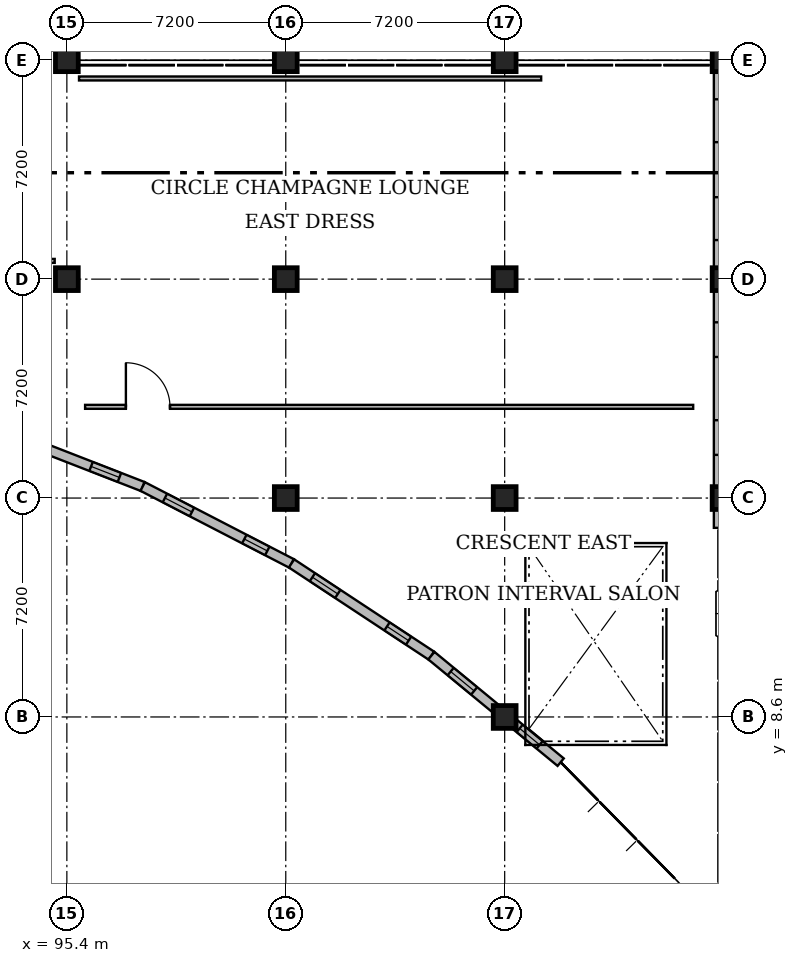
"""IFC4 building model, lengths in metres.
Left out: names, types, materials, properties, quantities, classifications, styles, units other than length and angle.
Written with IfcOpenShell. Run it as: python <this file> out.ifc"""

import sys

from ifc_helpers import new_model, si_unit, direction, frame, frame_2d, origin, origin_2d, place, context, subcontext, project, spatial, rectangle, circle, extrude, element, fill, save


model = new_model("IFC4")
c1 = context("Model", 3, precision=1e-05, world=origin(), true_north=direction((0.0, 1.0)))
c2 = subcontext(c1, "Body", "Model", "MODEL_VIEW")
j1 = project(units=[si_unit("LENGTHUNIT", "METRE"), si_unit("PLANEANGLEUNIT", "RADIAN")], contexts=[c1])
p1 = place(None, origin())
s1 = spatial("IfcSite", under=j1, at=p1, CompositionType="ELEMENT")
p2 = place(p1, origin())
s2 = spatial("IfcBuilding", under=s1, at=p2, CompositionType="ELEMENT")
p3 = place(p2, frame((0.0, 0.0, 4.8)))
s3 = spatial("IfcBuildingStorey", under=s2, at=p3, CompositionType="ELEMENT", Elevation=4.8)
for number, where, z_axis, x_axis in (
    (1, (95.4, 23.0, 0.0), (0.0, 0.0, 1.0), (1.0, 0.0, 0.0)),
    (2, (95.4, 30.2, 0.0), (0.0, 0.0, 1.0), (1.0, 0.0, 0.0)),
    (3, (102.6, 15.8, 0.0), (0.0, 0.0, 1.0), (1.0, 0.0, 0.0)),
    (4, (102.6, 23.0, 0.0), (0.0, 0.0, 1.0), (1.0, 0.0, 0.0)),
    (5, (102.6, 30.2, 0.0), (0.0, 0.0, 1.0), (1.0, 0.0, 0.0)),
    (6, (109.8, 8.6, 0.0), (0.0, 0.0, 1.0), (1.0, 0.0, 0.0)),
    (7, (109.8, 15.8, 0.0), (0.0, 0.0, 1.0), (1.0, 0.0, 0.0)),
    (8, (109.8, 23.0, 0.0), (0.0, 0.0, 1.0), (1.0, 0.0, 0.0)),
    (9, (109.8, 30.2, 0.0), (0.0, 0.0, 1.0), (1.0, 0.0, 0.0)),
    (10, (117.0, 15.8, 0.0), (0.0, 0.0, 1.0), (1.0, 0.0, 0.0)),
    (11, (117.0, 23.0, 0.0), (0.0, 0.0, 1.0), (1.0, 0.0, 0.0)),
    (12, (117.0, 30.2, 0.0), (0.0, 0.0, 1.0), (1.0, 0.0, 0.0)),
):
    element("IfcColumn", number, at=place(p3, frame(where, z_axis=z_axis, x_axis=x_axis)), inside=s3, PredefinedType="COLUMN", context=c2, shape_type="SweptSolid", body=[
        extrude(circle(Radius=0.375, at=origin_2d()), origin(), (0.0, 0.0, 1.0), 4.2),
    ])
p4 = place(p3, frame((92.76, 18.177, 0.0), z_axis=(0.0, 0.0, 1.0), x_axis=(0.931946449517, -0.362595939349, 0.0)))
e13 = element("IfcWall", 13, at=p4, inside=s3, PredefinedType="SOLIDWALL", context=c2, shape_type="SweptSolid", body=[
    extrude(rectangle(XDim=5.51, YDim=0.32, at=frame_2d((2.755, 0.0))), origin(), (0.0, 0.0, 1.0), 4.2),
])
p5 = place(p4, frame((0.823, 0.0, 0.78)))
e14 = element("IfcOpeningElement", 14, at=p5, cuts=e13, PredefinedType="OPENING", context=c2, shape_type="SweptSolid", body=[
    extrude(rectangle(XDim=1.0, YDim=1.95, at=frame_2d((0.5, 0.975))), frame((0.0, 0.18, 0.0), z_axis=(0.0, -1.0, 0.0), x_axis=(1.0, 0.0, 0.0)), (0.0, 0.0, 1.0), 0.36),
])
p6 = place(p4, frame((3.688, 0.0, 0.78)))
e15 = element("IfcOpeningElement", 15, at=p6, cuts=e13, PredefinedType="OPENING", context=c2, shape_type="SweptSolid", body=[
    extrude(rectangle(XDim=1.0, YDim=2.25, at=frame_2d((0.5, 1.125))), frame((0.0, 0.18, 0.0), z_axis=(0.0, -1.0, 0.0), x_axis=(1.0, 0.0, 0.0)), (0.0, 0.0, 1.0), 0.36),
])
p7 = place(p3, frame((97.895, 16.18, 0.0), z_axis=(0.0, 0.0, 1.0), x_axis=(0.888365365521, -0.459137209713, 0.0)))
e16 = element("IfcWall", 16, at=p7, inside=s3, PredefinedType="SOLIDWALL", context=c2, shape_type="SweptSolid", body=[
    extrude(rectangle(XDim=5.51, YDim=0.32, at=frame_2d((2.755, 0.0))), origin(), (0.0, 0.0, 1.0), 4.2),
])
p8 = place(p7, frame((0.823, 0.0, 0.633)))
e17 = element("IfcOpeningElement", 17, at=p8, cuts=e16, PredefinedType="OPENING", context=c2, shape_type="SweptSolid", body=[
    extrude(rectangle(XDim=1.0, YDim=2.05, at=frame_2d((0.5, 1.025))), frame((0.0, 0.18, 0.0), z_axis=(0.0, -1.0, 0.0), x_axis=(1.0, 0.0, 0.0)), (0.0, 0.0, 1.0), 0.36),
])
p9 = place(p7, frame((3.762, 0.0, 0.633)))
e18 = element("IfcOpeningElement", 18, at=p9, cuts=e16, PredefinedType="OPENING", context=c2, shape_type="SweptSolid", body=[
    extrude(rectangle(XDim=0.85, YDim=1.95, at=frame_2d((0.425, 0.975))), frame((0.0, 0.18, 0.0), z_axis=(0.0, -1.0, 0.0), x_axis=(1.0, 0.0, 0.0)), (0.0, 0.0, 1.0), 0.36),
])
p10 = place(p3, frame((102.79, 13.65, 0.0), z_axis=(0.0, 0.0, 1.0), x_axis=(0.834787412137, -0.550572408079, 0.0)))
e19 = element("IfcWall", 19, at=p10, inside=s3, PredefinedType="SOLIDWALL", context=c2, shape_type="SweptSolid", body=[
    extrude(rectangle(XDim=5.51, YDim=0.32, at=frame_2d((2.755, 0.0))), origin(), (0.0, 0.0, 1.0), 4.2),
])
p11 = place(p10, frame((0.822, 0.0, 0.514)))
e20 = element("IfcOpeningElement", 20, at=p11, cuts=e19, PredefinedType="OPENING", context=c2, shape_type="SweptSolid", body=[
    extrude(rectangle(XDim=1.0, YDim=2.15, at=frame_2d((0.5, 1.075))), frame((0.0, 0.18, 0.0), z_axis=(0.0, -1.0, 0.0), x_axis=(1.0, 0.0, 0.0)), (0.0, 0.0, 1.0), 0.36),
])
p12 = place(p10, frame((3.762, 0.0, 0.514)))
e21 = element("IfcOpeningElement", 21, at=p12, cuts=e19, PredefinedType="OPENING", context=c2, shape_type="SweptSolid", body=[
    extrude(rectangle(XDim=0.85, YDim=2.05, at=frame_2d((0.425, 1.025))), frame((0.0, 0.18, 0.0), z_axis=(0.0, -1.0, 0.0), x_axis=(1.0, 0.0, 0.0)), (0.0, 0.0, 1.0), 0.36),
])
p13 = place(p3, frame((107.389, 10.616, 0.0), z_axis=(0.0, 0.0, 1.0), x_axis=(0.771862443056, -0.635789563456, 0.0)))
e22 = element("IfcWall", 22, at=p13, inside=s3, PredefinedType="SOLIDWALL", context=c2, shape_type="SweptSolid", body=[
    extrude(rectangle(XDim=5.51, YDim=0.32, at=frame_2d((2.755, 0.0))), origin(), (0.0, 0.0, 1.0), 4.2),
])
p14 = place(p13, frame((0.823, 0.0, 0.448)))
e23 = element("IfcOpeningElement", 23, at=p14, cuts=e22, PredefinedType="OPENING", context=c2, shape_type="SweptSolid", body=[
    extrude(rectangle(XDim=1.0, YDim=2.25, at=frame_2d((0.5, 1.125))), frame((0.0, 0.18, 0.0), z_axis=(0.0, -1.0, 0.0), x_axis=(1.0, 0.0, 0.0)), (0.0, 0.0, 1.0), 0.36),
])
p15 = place(p13, frame((3.762, 0.0, 0.448)))
e24 = element("IfcOpeningElement", 24, at=p15, cuts=e22, PredefinedType="OPENING", context=c2, shape_type="SweptSolid", body=[
    extrude(rectangle(XDim=0.85, YDim=2.15, at=frame_2d((0.425, 1.075))), frame((0.0, 0.18, 0.0), z_axis=(0.0, -1.0, 0.0), x_axis=(1.0, 0.0, 0.0)), (0.0, 0.0, 1.0), 0.36),
])
p16 = place(p3, frame((116.84, 14.82, 0.0), z_axis=(0.0, 0.0, 1.0), x_axis=(0.0, 1.0, 0.0)))
e25 = element("IfcWall", 25, at=p16, inside=s3, PredefinedType="SOLIDWALL", context=c2, shape_type="SweptSolid", body=[
    extrude(rectangle(XDim=0.6, YDim=0.32, at=frame_2d((0.3, 0.0))), origin(), (0.0, 0.0, 1.0), 4.2),
])
p17 = place(p3, frame((116.84, 16.18, 0.0), z_axis=(0.0, 0.0, 1.0), x_axis=(0.0, 1.0, 0.0)))
e26 = element("IfcWall", 26, at=p17, inside=s3, PredefinedType="SOLIDWALL", context=c2, shape_type="SweptSolid", body=[
    extrude(rectangle(XDim=6.44, YDim=0.32, at=frame_2d((3.22, 0.0))), origin(), (0.0, 0.0, 1.0), 3.653),
])
p18 = place(p17, frame((1.04, 0.0, 0.95)))
e27 = element("IfcOpeningElement", 27, at=p18, cuts=e26, PredefinedType="OPENING", context=c2, shape_type="SweptSolid", body=[
    extrude(rectangle(XDim=1.14, YDim=1.6, at=frame_2d((0.57, 0.8))), frame((0.0, 0.18, 0.0), z_axis=(0.0, -1.0, 0.0), x_axis=(1.0, 0.0, 0.0)), (0.0, 0.0, 1.0), 0.36),
])
p19 = place(p17, frame((4.26, 0.0, 0.95)))
e28 = element("IfcOpeningElement", 28, at=p19, cuts=e26, PredefinedType="OPENING", context=c2, shape_type="SweptSolid", body=[
    extrude(rectangle(XDim=1.14, YDim=1.6, at=frame_2d((0.57, 0.8))), frame((0.0, 0.18, 0.0), z_axis=(0.0, -1.0, 0.0), x_axis=(1.0, 0.0, 0.0)), (0.0, 0.0, 1.0), 0.36),
])
p20 = place(p3, frame((116.84, 23.38, 0.0), z_axis=(0.0, 0.0, 1.0), x_axis=(0.0, 1.0, 0.0)))
e29 = element("IfcWall", 29, at=p20, inside=s3, PredefinedType="SOLIDWALL", context=c2, shape_type="SweptSolid", body=[
    extrude(rectangle(XDim=6.44, YDim=0.32, at=frame_2d((3.22, 0.0))), origin(), (0.0, 0.0, 1.0), 3.653),
])
p21 = place(p20, frame((0.905, 0.0, 0.95)))
e30 = element("IfcOpeningElement", 30, at=p21, cuts=e29, PredefinedType="OPENING", context=c2, shape_type="SweptSolid", body=[
    extrude(rectangle(XDim=1.41, YDim=1.7, at=frame_2d((0.705, 0.85))), frame((0.0, 0.18, 0.0), z_axis=(0.0, -1.0, 0.0), x_axis=(1.0, 0.0, 0.0)), (0.0, 0.0, 1.0), 0.36),
])
p22 = place(p20, frame((4.125, 0.0, 0.95)))
e31 = element("IfcOpeningElement", 31, at=p22, cuts=e29, PredefinedType="OPENING", context=c2, shape_type="SweptSolid", body=[
    extrude(rectangle(XDim=1.41, YDim=1.7, at=frame_2d((0.705, 0.85))), frame((0.0, 0.18, 0.0), z_axis=(0.0, -1.0, 0.0), x_axis=(1.0, 0.0, 0.0)), (0.0, 0.0, 1.0), 0.36),
])
p23 = place(p3, frame((95.8, 29.6, 0.0), z_axis=(0.0, 0.0, 1.0), x_axis=(1.0, 0.0, 0.0)))
e32 = element("IfcWall", 32, at=p23, inside=s3, PredefinedType="PARTITIONING", context=c2, shape_type="SweptSolid", body=[
    extrude(rectangle(XDim=15.2, YDim=0.13, at=frame_2d((7.6, 0.0))), origin(), (0.0, 0.0, 1.0), 3.94),
])
p24 = place(p3, frame((57.8, 23.6, 0.0), z_axis=(0.0, 0.0, 1.0), x_axis=(1.0, 0.0, 0.0)))
e33 = element("IfcWall", 33, at=p24, inside=s3, PredefinedType="PARTITIONING", context=c2, shape_type="SweptSolid", body=[
    extrude(rectangle(XDim=37.2, YDim=0.13, at=frame_2d((18.6, 0.0))), origin(), (0.0, 0.0, 1.0), 3.94),
])
p25 = place(p24, frame((15.265, 0.0, 0.0)))
e34 = element("IfcOpeningElement", 34, at=p25, cuts=e33, PredefinedType="OPENING", context=c2, shape_type="SweptSolid", body=[
    extrude(rectangle(XDim=1.45, YDim=2.2, at=frame_2d((0.725, 1.1))), frame((0.0, 0.085, 0.0), z_axis=(0.0, -1.0, 0.0), x_axis=(1.0, 0.0, 0.0)), (0.0, 0.0, 1.0), 0.17),
])
p26 = place(p3, frame((96.0, 18.8, 0.0), z_axis=(0.0, 0.0, 1.0), x_axis=(1.0, 0.0, 0.0)))
e35 = element("IfcWall", 35, at=p26, inside=s3, PredefinedType="PARTITIONING", context=c2, shape_type="SweptSolid", body=[
    extrude(rectangle(XDim=20.0, YDim=0.13, at=frame_2d((10.0, 0.0))), origin(), (0.0, 0.0, 1.0), 3.94),
])
p27 = place(p26, frame((1.342, 0.0, 0.0)))
e36 = element("IfcOpeningElement", 36, at=p27, cuts=e35, PredefinedType="OPENING", context=c2, shape_type="SweptSolid", body=[
    extrude(rectangle(XDim=1.45, YDim=2.2, at=frame_2d((0.725, 1.1))), frame((0.0, 0.085, 0.0), z_axis=(0.0, -1.0, 0.0), x_axis=(1.0, 0.0, 0.0)), (0.0, 0.0, 1.0), 0.17),
])
p28 = place(p6, origin())
e37 = element("IfcWindow", 37, at=p28, inside=s3, PartitioningType="SINGLE_PANEL", PredefinedType="WINDOW", context=c2, shape_type="SweptSolid", body=[
    extrude(rectangle(XDim=1.0, YDim=2.25, at=frame_2d((0.5, 1.125))), frame((0.0, 0.03, 0.0), z_axis=(0.0, -1.0, 0.0), x_axis=(1.0, 0.0, 0.0)), (0.0, 0.0, 1.0), 0.06),
])
fill(e15, e37)
p29 = place(p8, origin())
e38 = element("IfcWindow", 38, at=p29, inside=s3, PartitioningType="SINGLE_PANEL", PredefinedType="WINDOW", context=c2, shape_type="SweptSolid", body=[
    extrude(rectangle(XDim=1.0, YDim=2.05, at=frame_2d((0.5, 1.025))), frame((0.0, 0.03, 0.0), z_axis=(0.0, -1.0, 0.0), x_axis=(1.0, 0.0, 0.0)), (0.0, 0.0, 1.0), 0.06),
])
fill(e17, e38)
p30 = place(p9, origin())
e39 = element("IfcWindow", 39, at=p30, inside=s3, PartitioningType="SINGLE_PANEL", PredefinedType="WINDOW", context=c2, shape_type="SweptSolid", body=[
    extrude(rectangle(XDim=0.85, YDim=1.95, at=frame_2d((0.425, 0.975))), frame((0.0, 0.03, 0.0), z_axis=(0.0, -1.0, 0.0), x_axis=(1.0, 0.0, 0.0)), (0.0, 0.0, 1.0), 0.06),
])
fill(e18, e39)
p31 = place(p11, origin())
e40 = element("IfcWindow", 40, at=p31, inside=s3, PartitioningType="SINGLE_PANEL", PredefinedType="WINDOW", context=c2, shape_type="SweptSolid", body=[
    extrude(rectangle(XDim=1.0, YDim=2.15, at=frame_2d((0.5, 1.075))), frame((0.0, 0.03, 0.0), z_axis=(0.0, -1.0, 0.0), x_axis=(1.0, 0.0, 0.0)), (0.0, 0.0, 1.0), 0.06),
])
fill(e20, e40)
p32 = place(p12, origin())
e41 = element("IfcWindow", 41, at=p32, inside=s3, PartitioningType="SINGLE_PANEL", PredefinedType="WINDOW", context=c2, shape_type="SweptSolid", body=[
    extrude(rectangle(XDim=0.85, YDim=2.05, at=frame_2d((0.425, 1.025))), frame((0.0, 0.03, 0.0), z_axis=(0.0, -1.0, 0.0), x_axis=(1.0, 0.0, 0.0)), (0.0, 0.0, 1.0), 0.06),
])
fill(e21, e41)
p33 = place(p14, origin())
e42 = element("IfcWindow", 42, at=p33, inside=s3, PartitioningType="SINGLE_PANEL", PredefinedType="WINDOW", context=c2, shape_type="SweptSolid", body=[
    extrude(rectangle(XDim=1.0, YDim=2.25, at=frame_2d((0.5, 1.125))), frame((0.0, 0.03, 0.0), z_axis=(0.0, -1.0, 0.0), x_axis=(1.0, 0.0, 0.0)), (0.0, 0.0, 1.0), 0.06),
])
fill(e23, e42)
p34 = place(p15, origin())
e43 = element("IfcWindow", 43, at=p34, inside=s3, PartitioningType="SINGLE_PANEL", PredefinedType="WINDOW", context=c2, shape_type="SweptSolid", body=[
    extrude(rectangle(XDim=0.85, YDim=2.15, at=frame_2d((0.425, 1.075))), frame((0.0, 0.03, 0.0), z_axis=(0.0, -1.0, 0.0), x_axis=(1.0, 0.0, 0.0)), (0.0, 0.0, 1.0), 0.06),
])
fill(e24, e43)
p35 = place(p18, origin())
e44 = element("IfcWindow", 44, at=p35, inside=s3, PartitioningType="SINGLE_PANEL", PredefinedType="WINDOW", context=c2, shape_type="SweptSolid", body=[
    extrude(rectangle(XDim=1.14, YDim=1.6, at=frame_2d((0.57, 0.8))), frame((0.0, 0.03, 0.0), z_axis=(0.0, -1.0, 0.0), x_axis=(1.0, 0.0, 0.0)), (0.0, 0.0, 1.0), 0.06),
])
fill(e27, e44)
p36 = place(p19, origin())
e45 = element("IfcWindow", 45, at=p36, inside=s3, PartitioningType="SINGLE_PANEL", PredefinedType="WINDOW", context=c2, shape_type="SweptSolid", body=[
    extrude(rectangle(XDim=1.14, YDim=1.6, at=frame_2d((0.57, 0.8))), frame((0.0, 0.03, 0.0), z_axis=(0.0, -1.0, 0.0), x_axis=(1.0, 0.0, 0.0)), (0.0, 0.0, 1.0), 0.06),
])
fill(e28, e45)
p37 = place(p21, origin())
e46 = element("IfcWindow", 46, at=p37, inside=s3, PartitioningType="SINGLE_PANEL", PredefinedType="WINDOW", context=c2, shape_type="SweptSolid", body=[
    extrude(rectangle(XDim=1.41, YDim=1.7, at=frame_2d((0.705, 0.85))), frame((0.0, 0.03, 0.0), z_axis=(0.0, -1.0, 0.0), x_axis=(1.0, 0.0, 0.0)), (0.0, 0.0, 1.0), 0.06),
])
fill(e30, e46)
p38 = place(p22, origin())
e47 = element("IfcWindow", 47, at=p38, inside=s3, PartitioningType="SINGLE_PANEL", PredefinedType="WINDOW", context=c2, shape_type="SweptSolid", body=[
    extrude(rectangle(XDim=1.41, YDim=1.7, at=frame_2d((0.705, 0.85))), frame((0.0, 0.03, 0.0), z_axis=(0.0, -1.0, 0.0), x_axis=(1.0, 0.0, 0.0)), (0.0, 0.0, 1.0), 0.06),
])
fill(e31, e47)
p39 = place(p27, origin())
e48 = element("IfcDoor", 48, at=p39, inside=s3, OperationType="DOUBLE_DOOR_SINGLE_SWING", PredefinedType="DOOR", context=c2, shape_type="SweptSolid", body=[
    extrude(rectangle(XDim=1.45, YDim=2.2, at=frame_2d((0.725, 1.1))), frame((0.0, 0.025, 0.0), z_axis=(0.0, -1.0, 0.0), x_axis=(1.0, 0.0, 0.0)), (0.0, 0.0, 1.0), 0.05),
])
fill(e36, e48)
save(model, sys.argv[1])
